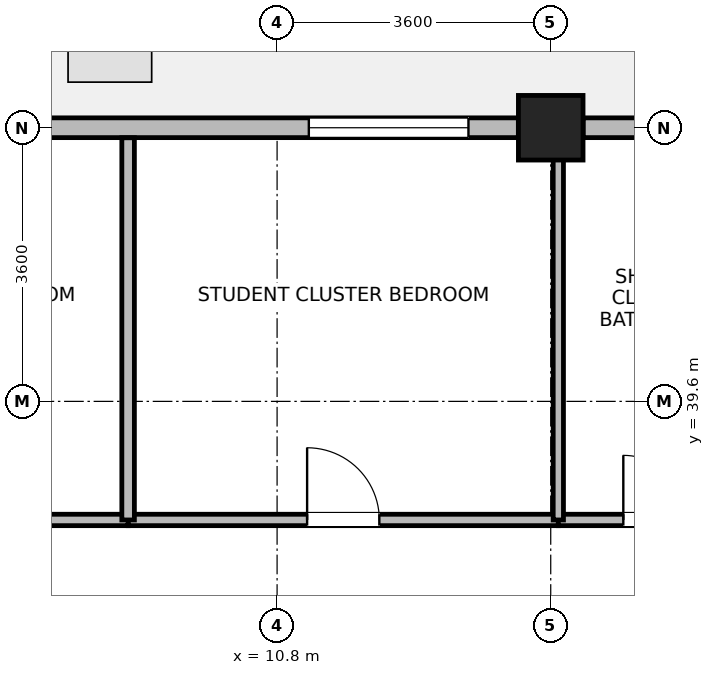
"""IFC4 building model, lengths in metres.
Left out: names, types, materials, properties, quantities, classifications, styles, units other than length and angle.
Written with IfcOpenShell. Run it as: python <this file> out.ifc"""

import sys

from ifc_helpers import new_model, si_unit, direction, frame, frame_2d, origin, origin_2d, place, context, subcontext, project, spatial, rectangle, extrude, source, transform, mapped, element, fill, save


model = new_model("IFC4")
c1 = context("Model", 3, precision=1e-05, world=origin(), true_north=direction((0.0, 1.0)))
c2 = subcontext(c1, "Body", "Model", "MODEL_VIEW")
j1 = project(units=[si_unit("LENGTHUNIT", "METRE"), si_unit("PLANEANGLEUNIT", "RADIAN")], contexts=[c1])
p1 = place(None, origin())
s1 = spatial("IfcSite", under=j1, at=p1, CompositionType="ELEMENT")
p2 = place(p1, origin())
s2 = spatial("IfcBuilding", under=s1, at=p2, CompositionType="ELEMENT")
p3 = place(p2, frame((0.0, 0.0, 257.3)))
s3 = spatial("IfcBuildingStorey", under=s2, at=p3, CompositionType="ELEMENT", Elevation=257.3)
m1 = source(origin(), c2, "Body", "SweptSolid", [
    extrude(rectangle(XDim=0.85, YDim=0.85, at=origin_2d()), origin(), (0.0, 0.0, 1.0), 3.7),
])
p4 = place(p3, frame((14.4, 43.2, 0.0), z_axis=(0.0, 0.0, 1.0), x_axis=(1.0, 0.0, 0.0)))
e1 = element("IfcColumn", 1, at=p4, inside=s3, PredefinedType="COLUMN", context=c2, shape_type="MappedRepresentation", body=[
    mapped(m1, transform((0.0, 0.0, 0.0), x_axis=(1.0, 0.0, 0.0), y_axis=(0.0, 1.0, 0.0), z_axis=(0.0, 0.0, 1.0), scale=1.0)),
])
p5 = place(p3, frame((14.826, 43.2, 0.0), z_axis=(0.0, 0.0, 1.0), x_axis=(1.0, 0.0, 0.0)))
e2 = element("IfcWall", 2, at=p5, inside=s3, PredefinedType="STANDARD", context=c2, shape_type="SweptSolid", body=[
    extrude(rectangle(XDim=2.986, YDim=0.26, at=frame_2d((1.493, 0.0))), origin(), (0.0, 0.0, 1.0), 3.055),
])
p6 = place(p5, frame((1.018, 0.0, 0.85)))
e3 = element("IfcOpeningElement", 3, at=p6, cuts=e2, PredefinedType="OPENING", context=c2, shape_type="SweptSolid", body=[
    extrude(rectangle(XDim=0.95, YDim=1.75, at=frame_2d((0.475, 0.875))), frame((0.0, 0.14, 0.0), z_axis=(0.0, -1.0, 0.0), x_axis=(1.0, 0.0, 0.0)), (0.0, 0.0, 1.0), 0.28),
])
p7 = place(p3, frame((3.735, 43.2, 0.0), z_axis=(0.0, 0.0, 1.0), x_axis=(1.0, 0.0, 0.0)))
e4 = element("IfcWall", 4, at=p7, inside=s3, PredefinedType="STANDARD", context=c2, shape_type="SweptSolid", body=[
    extrude(rectangle(XDim=10.239, YDim=0.26, at=frame_2d((5.12, 0.0))), origin(), (0.0, 0.0, 1.0), 3.455),
])
p8 = place(p7, frame((0.656, 0.0, 0.85)))
e5 = element("IfcOpeningElement", 5, at=p8, cuts=e4, PredefinedType="OPENING", context=c2, shape_type="SweptSolid", body=[
    extrude(rectangle(XDim=2.1, YDim=1.95, at=frame_2d((1.05, 0.975))), frame((0.0, 0.14, 0.0), z_axis=(0.0, -1.0, 0.0), x_axis=(1.0, 0.0, 0.0)), (0.0, 0.0, 1.0), 0.28),
])
p9 = place(p7, frame((7.482, 0.0, 0.85)))
e6 = element("IfcOpeningElement", 6, at=p9, cuts=e4, PredefinedType="OPENING", context=c2, shape_type="SweptSolid", body=[
    extrude(rectangle(XDim=2.1, YDim=1.95, at=frame_2d((1.05, 0.975))), frame((0.0, 0.14, 0.0), z_axis=(0.0, -1.0, 0.0), x_axis=(1.0, 0.0, 0.0)), (0.0, 0.0, 1.0), 0.28),
])
p10 = place(p3, frame((8.84, 38.04, 0.0), z_axis=(0.0, 0.0, 1.0), x_axis=(1.0, 0.0, 0.0)))
e7 = element("IfcWall", 7, at=p10, inside=s3, PredefinedType="PARTITIONING", context=c2, shape_type="SweptSolid", body=[
    extrude(rectangle(XDim=5.66, YDim=0.15, at=frame_2d((2.83, 0.0))), origin(), (0.0, 0.0, 1.0), 3.455),
])
p11 = place(p10, frame((2.355, 0.0, 0.0)))
e8 = element("IfcOpeningElement", 8, at=p11, cuts=e7, PredefinedType="OPENING", context=c2, shape_type="SweptSolid", body=[
    extrude(rectangle(XDim=0.95, YDim=2.1, at=frame_2d((0.475, 1.05))), frame((0.0, 0.085, 0.0), z_axis=(0.0, -1.0, 0.0), x_axis=(1.0, 0.0, 0.0)), (0.0, 0.0, 1.0), 0.17),
])
p12 = place(p3, frame((3.732, 38.04, 0.0), z_axis=(0.0, 0.0, 1.0), x_axis=(1.0, 0.0, 0.0)))
e9 = element("IfcWall", 9, at=p12, inside=s3, PredefinedType="PARTITIONING", context=c2, shape_type="SweptSolid", body=[
    extrude(rectangle(XDim=5.108, YDim=0.15, at=frame_2d((2.554, 0.0))), origin(), (0.0, 0.0, 1.0), 3.455),
])
p13 = place(p12, frame((2.079, 0.0, 0.0)))
e10 = element("IfcOpeningElement", 10, at=p13, cuts=e9, PredefinedType="OPENING", context=c2, shape_type="SweptSolid", body=[
    extrude(rectangle(XDim=0.95, YDim=2.1, at=frame_2d((0.475, 1.05))), frame((0.0, 0.085, 0.0), z_axis=(0.0, -1.0, 0.0), x_axis=(1.0, 0.0, 0.0)), (0.0, 0.0, 1.0), 0.17),
])
p14 = place(p3, frame((14.5, 38.04, 0.0), z_axis=(0.0, 0.0, 1.0), x_axis=(1.0, 0.0, 0.0)))
e11 = element("IfcWall", 11, at=p14, inside=s3, PredefinedType="PARTITIONING", context=c2, shape_type="SweptSolid", body=[
    extrude(rectangle(XDim=2.56, YDim=0.15, at=frame_2d((1.28, 0.0))), origin(), (0.0, 0.0, 1.0), 3.455),
])
p15 = place(p14, frame((0.855, 0.0, 0.0)))
e12 = element("IfcOpeningElement", 12, at=p15, cuts=e11, PredefinedType="OPENING", context=c2, shape_type="SweptSolid", body=[
    extrude(rectangle(XDim=0.85, YDim=2.04, at=frame_2d((0.425, 1.02))), frame((0.0, 0.085, 0.0), z_axis=(0.0, -1.0, 0.0), x_axis=(1.0, 0.0, 0.0)), (0.0, 0.0, 1.0), 0.17),
])
p16 = place(p3, frame((8.84, 38.04, 0.0), z_axis=(0.0, 0.0, 1.0), x_axis=(0.0, 1.0, 0.0)))
e13 = element("IfcWall", 13, at=p16, inside=s3, PredefinedType="PARTITIONING", context=c2, shape_type="SweptSolid", body=[
    extrude(rectangle(XDim=5.028, YDim=0.165, at=frame_2d((2.514, 0.0))), origin(), (0.0, 0.0, 1.0), 3.455),
])
p17 = place(p3, frame((14.5, 38.04, 0.0), z_axis=(0.0, 0.0, 1.0), x_axis=(0.0, 1.0, 0.0)))
e14 = element("IfcWall", 14, at=p17, inside=s3, PredefinedType="PARTITIONING", context=c2, shape_type="SweptSolid", body=[
    extrude(rectangle(XDim=5.028, YDim=0.135, at=frame_2d((2.514, 0.0))), origin(), (0.0, 0.0, 1.0), 3.055),
])
p18 = place(p9, origin())
e15 = element("IfcWindow", 15, at=p18, inside=s3, PartitioningType="SINGLE_PANEL", PredefinedType="WINDOW", context=c2, shape_type="SweptSolid", body=[
    extrude(rectangle(XDim=2.1, YDim=1.95, at=frame_2d((1.05, 0.975))), frame((0.0, 0.03, 0.0), z_axis=(0.0, -1.0, 0.0), x_axis=(1.0, 0.0, 0.0)), (0.0, 0.0, 1.0), 0.06),
])
fill(e6, e15)
p19 = place(p11, origin())
e16 = element("IfcDoor", 16, at=p19, inside=s3, OperationType="SINGLE_SWING_LEFT", PredefinedType="DOOR", context=c2, shape_type="SweptSolid", body=[
    extrude(rectangle(XDim=0.95, YDim=2.1, at=frame_2d((0.475, 1.05))), frame((0.0, 0.025, 0.0), z_axis=(0.0, -1.0, 0.0), x_axis=(1.0, 0.0, 0.0)), (0.0, 0.0, 1.0), 0.05),
])
fill(e8, e16)
p20 = place(p15, origin())
e17 = element("IfcDoor", 17, at=p20, inside=s3, OperationType="SINGLE_SWING_LEFT", PredefinedType="DOOR", context=c2, shape_type="SweptSolid", body=[
    extrude(rectangle(XDim=0.85, YDim=2.04, at=frame_2d((0.425, 1.02))), frame((0.0, 0.025, 0.0), z_axis=(0.0, -1.0, 0.0), x_axis=(1.0, 0.0, 0.0)), (0.0, 0.0, 1.0), 0.05),
])
fill(e12, e17)
save(model, sys.argv[1])
